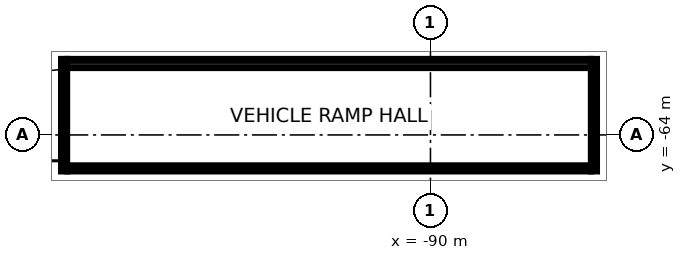
"""IFC4 building model, lengths in metres.
Left out: names, types, materials, properties, quantities, classifications, styles, units other than length and angle.
Written with IfcOpenShell. Run it as: python <this file> out.ifc"""

import sys

from ifc_helpers import new_model, si_unit, direction, frame, frame_2d, origin, place, context, subcontext, project, spatial, rectangle, extrude, element, fill, save


model = new_model("IFC4")
c1 = context("Model", 3, precision=1e-05, world=origin(), true_north=direction((0.0, 1.0)))
c2 = subcontext(c1, "Body", "Model", "MODEL_VIEW")
j1 = project(units=[si_unit("LENGTHUNIT", "METRE"), si_unit("PLANEANGLEUNIT", "RADIAN")], contexts=[c1])
p1 = place(None, origin())
s1 = spatial("IfcSite", under=j1, at=p1, CompositionType="ELEMENT")
p2 = place(p1, origin())
s2 = spatial("IfcBuilding", under=s1, at=p2, CompositionType="ELEMENT")
p3 = place(p2, origin())
s3 = spatial("IfcBuildingStorey", under=s2, at=p3, CompositionType="ELEMENT", Elevation=0.0)
p4 = place(p3, frame((-114.1, -66.4, 0.0), z_axis=(0.0, 0.0, 1.0), x_axis=(0.0, 1.0, 0.0)))
e1 = element("IfcWall", 1, at=p4, inside=s3, PredefinedType="SOLIDWALL", context=c2, shape_type="SweptSolid", body=[
    extrude(rectangle(XDim=7.4, YDim=0.4, at=frame_2d((3.7, 0.0))), origin(), (0.0, 0.0, 1.0), 4.5),
])
p5 = place(p4, frame((0.7, 0.0, 0.0)))
e2 = element("IfcOpeningElement", 2, at=p5, cuts=e1, PredefinedType="OPENING", context=c2, shape_type="SweptSolid", body=[
    extrude(rectangle(XDim=6.0, YDim=3.6, at=frame_2d((3.0, 1.8))), frame((0.0, 0.21, 0.0), z_axis=(0.0, -1.0, 0.0), x_axis=(1.0, 0.0, 0.0)), (0.0, 0.0, 1.0), 0.42),
])
p6 = place(p3, frame((-113.9, -59.3, 0.0), z_axis=(0.0, 0.0, 1.0), x_axis=(1.0, 0.0, 0.0)))
e3 = element("IfcWall", 3, at=p6, inside=s3, PredefinedType="SOLIDWALL", context=c2, shape_type="SweptSolid", body=[
    extrude(rectangle(XDim=34.453, YDim=0.6, at=frame_2d((17.226, 0.0))), origin(), (0.0, 0.0, 1.0), 4.5),
])
p7 = place(p3, frame((-113.9, -66.2, 0.0), z_axis=(0.0, 0.0, 1.0), x_axis=(1.0, 0.0, 0.0)))
e4 = element("IfcWall", 4, at=p7, inside=s3, PredefinedType="SOLIDWALL", context=c2, shape_type="SweptSolid", body=[
    extrude(rectangle(XDim=34.453, YDim=0.4, at=frame_2d((17.226, 0.0))), origin(), (0.0, 0.0, 1.0), 4.5),
])
p8 = place(p3, frame((-79.247, -66.4, 0.0), z_axis=(0.0, 0.0, 1.0), x_axis=(0.0, 1.0, 0.0)))
e5 = element("IfcWall", 5, at=p8, inside=s3, PredefinedType="SOLIDWALL", context=c2, shape_type="SweptSolid", body=[
    extrude(rectangle(XDim=7.4, YDim=0.4, at=frame_2d((3.7, 0.0))), origin(), (0.0, 0.0, 1.0), 4.5),
])
for number, where, z_axis, x_axis in (
    (6, (-114.1, -66.3, 4.8), (0.0, 0.0, 1.0), (1.0, 0.0, 0.0)),
    (7, (-114.1, -59.1, 4.8), (0.0, 0.0, 1.0), (1.0, 0.0, 0.0)),
):
    element("IfcWall", number, at=place(p3, frame(where, z_axis=z_axis, x_axis=x_axis)), inside=s3, PredefinedType="PARAPET", context=c2, shape_type="SweptSolid", body=[
        extrude(rectangle(XDim=34.853, YDim=0.2, at=frame_2d((17.426, 0.0))), origin(), (0.0, 0.0, 1.0), 1.1),
    ])
for number, where, z_axis, x_axis in (
    (8, (-114.2, -66.4, 4.8), (0.0, 0.0, 1.0), (0.0, 1.0, 0.0)),
    (9, (-79.147, -66.4, 4.8), (0.0, 0.0, 1.0), (0.0, 1.0, 0.0)),
):
    element("IfcWall", number, at=place(p3, frame(where, z_axis=z_axis, x_axis=x_axis)), inside=s3, PredefinedType="PARAPET", context=c2, shape_type="SweptSolid", body=[
        extrude(rectangle(XDim=7.4, YDim=0.2, at=frame_2d((3.7, 0.0))), origin(), (0.0, 0.0, 1.0), 1.1),
    ])
p9 = place(p5, origin())
e10 = element("IfcDoor", 10, at=p9, inside=s3, OperationType="ROLLINGUP", PredefinedType="DOOR", context=c2, shape_type="SweptSolid", body=[
    extrude(rectangle(XDim=6.0, YDim=3.6, at=frame_2d((3.0, 1.8))), frame((0.0, 0.025, 0.0), z_axis=(0.0, -1.0, 0.0), x_axis=(1.0, 0.0, 0.0)), (0.0, 0.0, 1.0), 0.05),
])
fill(e2, e10)
save(model, sys.argv[1])
